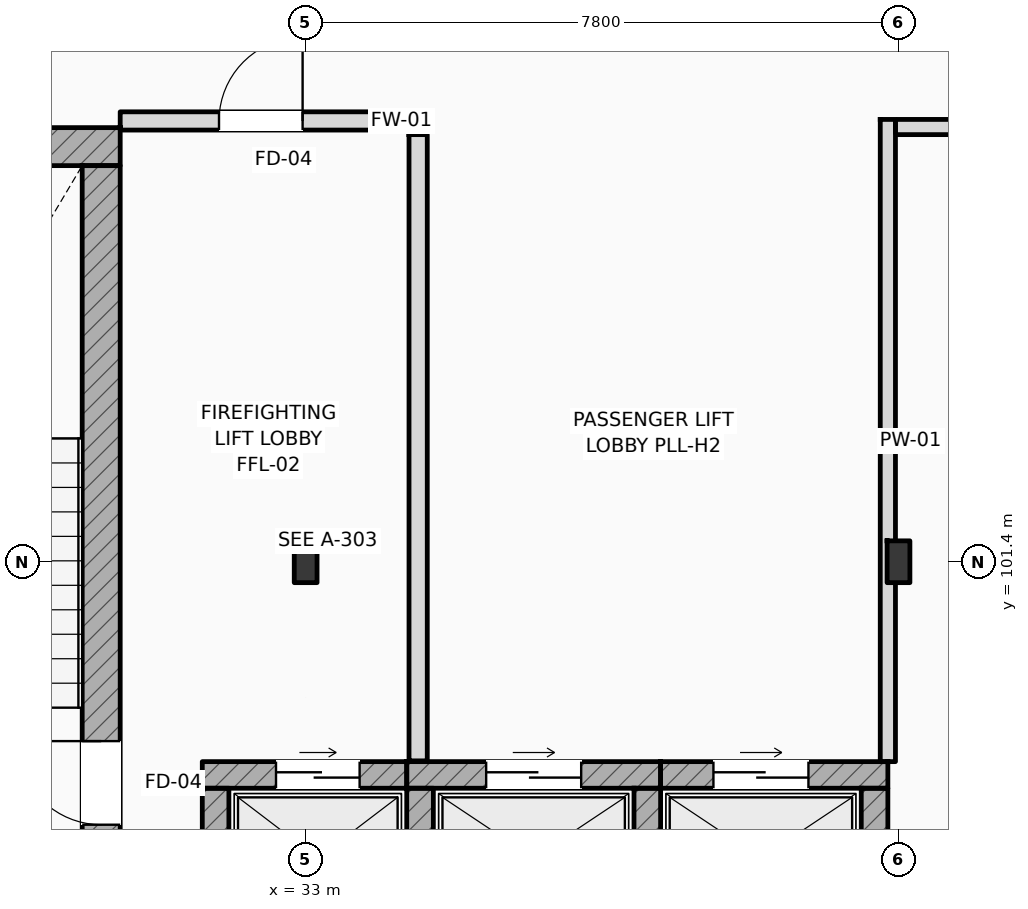
"""IFC4 building model, lengths in metres.
Left out: names, types, materials, properties, quantities, classifications, styles, units other than length and angle.
Written with IfcOpenShell. Run it as: python <this file> out.ifc"""

import sys

from ifc_helpers import new_model, si_unit, direction, frame, frame_2d, origin, origin_2d, place, context, subcontext, project, spatial, rectangle, i_section, extrude, element, fill, save


model = new_model("IFC4")
c1 = context("Model", 3, precision=1e-05, world=origin(), true_north=direction((0.0, 1.0)))
c2 = subcontext(c1, "Body", "Model", "MODEL_VIEW")
j1 = project(units=[si_unit("LENGTHUNIT", "METRE"), si_unit("PLANEANGLEUNIT", "RADIAN")], contexts=[c1])
p1 = place(None, origin())
s1 = spatial("IfcSite", under=j1, at=p1, CompositionType="ELEMENT")
p2 = place(p1, origin())
s2 = spatial("IfcBuilding", under=s1, at=p2, CompositionType="ELEMENT")
p3 = place(p2, frame((0.0, 0.0, 20.4)))
s3 = spatial("IfcBuildingStorey", under=s2, at=p3, CompositionType="ELEMENT", Elevation=20.4)
for number, where, z_axis, x_axis in (
    (1, (33.0, 101.4, 0.0), (0.0, 0.0, 1.0), (1.0, 0.0, 0.0)),
    (2, (40.8, 101.4, 0.0), (0.0, 0.0, 1.0), (1.0, 0.0, 0.0)),
):
    element("IfcColumn", number, at=place(p3, frame(where, z_axis=z_axis, x_axis=x_axis)), inside=s3, PredefinedType="COLUMN", context=c2, shape_type="SweptSolid", body=[
        extrude(i_section(OverallWidth=0.3, OverallDepth=0.55, WebThickness=0.015, FlangeThickness=0.029, FilletRadius=0.027, at=origin_2d()), origin(), (0.0, 0.0, 1.0), 4.2),
    ])
p4 = place(p3, frame((25.4, 106.862, 0.0), z_axis=(0.0, 0.0, 1.0), x_axis=(1.0, 0.0, 0.0)))
e3 = element("IfcWall", 3, at=p4, inside=s3, PredefinedType="SHEAR", context=c2, shape_type="SweptSolid", body=[
    extrude(rectangle(XDim=5.16, YDim=0.5, at=frame_2d((2.58, 0.0))), origin(), (0.0, 0.0, 1.0), 4.2),
])
p5 = place(p3, frame((30.31, 97.5, 0.0), z_axis=(0.0, 0.0, 1.0), x_axis=(0.0, 1.0, 0.0)))
e4 = element("IfcWall", 4, at=p5, inside=s3, PredefinedType="SHEAR", context=c2, shape_type="SweptSolid", body=[
    extrude(rectangle(XDim=9.112, YDim=0.5, at=frame_2d((4.556, 0.0))), origin(), (0.0, 0.0, 1.0), 4.2),
])
p6 = place(p5, frame((0.44, 0.0, 0.0)))
e5 = element("IfcOpeningElement", 5, at=p6, cuts=e4, PredefinedType="OPENING", context=c2, shape_type="SweptSolid", body=[
    extrude(rectangle(XDim=1.1, YDim=2.2, at=frame_2d((0.55, 1.1))), frame((0.0, 0.26, 0.0), z_axis=(0.0, -1.0, 0.0), x_axis=(1.0, 0.0, 0.0)), (0.0, 0.0, 1.0), 0.52),
])
p7 = place(p3, frame((31.64, 98.595, 0.0), z_axis=(0.0, 0.0, 1.0), x_axis=(1.0, 0.0, 0.0)))
e6 = element("IfcWall", 6, at=p7, inside=s3, PredefinedType="SHEAR", context=c2, shape_type="SweptSolid", body=[
    extrude(rectangle(XDim=2.69, YDim=0.35, at=frame_2d((1.345, 0.0))), origin(), (0.0, 0.0, 1.0), 3.94),
])
p8 = place(p7, frame((0.97, 0.0, 0.0)))
e7 = element("IfcOpeningElement", 7, at=p8, cuts=e6, PredefinedType="OPENING", context=c2, shape_type="SweptSolid", body=[
    extrude(rectangle(XDim=1.1, YDim=2.2, at=frame_2d((0.55, 1.1))), frame((0.0, 0.185, 0.0), z_axis=(0.0, -1.0, 0.0), x_axis=(1.0, 0.0, 0.0)), (0.0, 0.0, 1.0), 0.37),
])
p9 = place(p3, frame((31.815, 96.58, 0.0), z_axis=(0.0, 0.0, 1.0), x_axis=(0.0, 1.0, 0.0)))
e8 = element("IfcWall", 8, at=p9, inside=s3, PredefinedType="SHEAR", context=c2, shape_type="SweptSolid", body=[
    extrude(rectangle(XDim=1.84, YDim=0.35, at=frame_2d((0.92, 0.0))), origin(), (0.0, 0.0, 1.0), 3.94),
])
p10 = place(p3, frame((34.33, 98.595, 0.0), z_axis=(0.0, 0.0, 1.0), x_axis=(1.0, 0.0, 0.0)))
e9 = element("IfcWall", 9, at=p10, inside=s3, PredefinedType="SHEAR", context=c2, shape_type="SweptSolid", body=[
    extrude(rectangle(XDim=3.34, YDim=0.35, at=frame_2d((1.67, 0.0))), origin(), (0.0, 0.0, 1.0), 3.94),
])
p11 = place(p10, frame((1.045, 0.0, 0.0)))
e10 = element("IfcOpeningElement", 10, at=p11, cuts=e9, PredefinedType="OPENING", context=c2, shape_type="SweptSolid", body=[
    extrude(rectangle(XDim=1.25, YDim=2.25, at=frame_2d((0.625, 1.125))), frame((0.0, 0.185, 0.0), z_axis=(0.0, -1.0, 0.0), x_axis=(1.0, 0.0, 0.0)), (0.0, 0.0, 1.0), 0.37),
])
for number, where, z_axis, x_axis in (
    (11, (34.505, 96.58, 0.0), (0.0, 0.0, 1.0), (0.0, 1.0, 0.0)),
    (12, (37.495, 96.58, 0.0), (0.0, 0.0, 1.0), (0.0, 1.0, 0.0)),
):
    element("IfcWall", number, at=place(p3, frame(where, z_axis=z_axis, x_axis=x_axis)), inside=s3, PredefinedType="SHEAR", context=c2, shape_type="SweptSolid", body=[
        extrude(rectangle(XDim=1.84, YDim=0.35, at=frame_2d((0.92, 0.0))), origin(), (0.0, 0.0, 1.0), 3.94),
    ])
p12 = place(p3, frame((37.67, 98.595, 0.0), z_axis=(0.0, 0.0, 1.0), x_axis=(1.0, 0.0, 0.0)))
e13 = element("IfcWall", 13, at=p12, inside=s3, PredefinedType="SHEAR", context=c2, shape_type="SweptSolid", body=[
    extrude(rectangle(XDim=2.99, YDim=0.35, at=frame_2d((1.495, 0.0))), origin(), (0.0, 0.0, 1.0), 3.94),
])
p13 = place(p12, frame((0.695, 0.0, 0.0)))
e14 = element("IfcOpeningElement", 14, at=p13, cuts=e13, PredefinedType="OPENING", context=c2, shape_type="SweptSolid", body=[
    extrude(rectangle(XDim=1.25, YDim=2.25, at=frame_2d((0.625, 1.125))), frame((0.0, 0.185, 0.0), z_axis=(0.0, -1.0, 0.0), x_axis=(1.0, 0.0, 0.0)), (0.0, 0.0, 1.0), 0.37),
])
p14 = place(p3, frame((40.485, 96.58, 0.0), z_axis=(0.0, 0.0, 1.0), x_axis=(0.0, 1.0, 0.0)))
e15 = element("IfcWall", 15, at=p14, inside=s3, PredefinedType="SHEAR", context=c2, shape_type="SweptSolid", body=[
    extrude(rectangle(XDim=1.84, YDim=0.35, at=frame_2d((0.92, 0.0))), origin(), (0.0, 0.0, 1.0), 3.53),
])
p15 = place(p3, frame((34.48, 98.78, 0.0), z_axis=(0.0, 0.0, 1.0), x_axis=(0.0, 1.0, 0.0)))
e16 = element("IfcWall", 16, at=p15, inside=s3, PredefinedType="STANDARD", context=c2, shape_type="SweptSolid", body=[
    extrude(rectangle(XDim=8.24, YDim=0.24, at=frame_2d((4.12, 0.0))), origin(), (0.0, 0.0, 1.0), 3.94),
])
p16 = place(p3, frame((30.56, 107.2, 0.0), z_axis=(0.0, 0.0, 1.0), x_axis=(1.0, 0.0, 0.0)))
e17 = element("IfcWall", 17, at=p16, inside=s3, PredefinedType="STANDARD", context=c2, shape_type="SweptSolid", body=[
    extrude(rectangle(XDim=4.1, YDim=0.24, at=frame_2d((2.05, 0.0))), origin(), (0.0, 0.0, 1.0), 3.94),
])
p17 = place(p16, frame((1.3, 0.0, 0.0)))
e18 = element("IfcOpeningElement", 18, at=p17, cuts=e17, PredefinedType="OPENING", context=c2, shape_type="SweptSolid", body=[
    extrude(rectangle(XDim=1.1, YDim=2.2, at=frame_2d((0.55, 1.1))), frame((0.0, 0.13, 0.0), z_axis=(0.0, -1.0, 0.0), x_axis=(1.0, 0.0, 0.0)), (0.0, 0.0, 1.0), 0.26),
])
p18 = place(p3, frame((40.76, 107.12, 0.0), z_axis=(0.0, 0.0, 1.0), x_axis=(1.0, 0.0, 0.0)))
e19 = element("IfcWall", 19, at=p18, inside=s3, PredefinedType="PARTITIONING", context=c2, shape_type="SweptSolid", body=[
    extrude(rectangle(XDim=23.44, YDim=0.2, at=frame_2d((11.72, 0.0))), origin(), (0.0, 0.0, 1.0), 3.94),
])
p19 = place(p18, frame((11.0, 0.0, 0.0)))
e20 = element("IfcOpeningElement", 20, at=p19, cuts=e19, PredefinedType="OPENING", context=c2, shape_type="SweptSolid", body=[
    extrude(rectangle(XDim=1.3, YDim=2.2, at=frame_2d((0.65, 1.1))), frame((0.0, 0.11, 0.0), z_axis=(0.0, -1.0, 0.0), x_axis=(1.0, 0.0, 0.0)), (0.0, 0.0, 1.0), 0.22),
])
p20 = place(p3, frame((40.66, 98.77, 0.0), z_axis=(0.0, 0.0, 1.0), x_axis=(0.0, 1.0, 0.0)))
e21 = element("IfcWall", 21, at=p20, inside=s3, PredefinedType="PARTITIONING", context=c2, shape_type="SweptSolid", body=[
    extrude(rectangle(XDim=8.45, YDim=0.2, at=frame_2d((4.225, 0.0))), origin(), (0.0, 0.0, 1.0), 3.53),
])
p21 = place(p6, origin())
e22 = element("IfcDoor", 22, at=p21, inside=s3, OperationType="SINGLE_SWING_RIGHT", PredefinedType="DOOR", context=c2, shape_type="SweptSolid", body=[
    extrude(rectangle(XDim=1.1, YDim=2.2, at=frame_2d((0.55, 1.1))), frame((0.0, 0.025, 0.0), z_axis=(0.0, -1.0, 0.0), x_axis=(1.0, 0.0, 0.0)), (0.0, 0.0, 1.0), 0.05),
])
fill(e5, e22)
p22 = place(p8, origin())
e23 = element("IfcDoor", 23, at=p22, inside=s3, OperationType="SLIDING_TO_LEFT", PredefinedType="DOOR", context=c2, shape_type="SweptSolid", body=[
    extrude(rectangle(XDim=1.1, YDim=2.2, at=frame_2d((0.55, 1.1))), frame((0.0, 0.025, 0.0), z_axis=(0.0, -1.0, 0.0), x_axis=(1.0, 0.0, 0.0)), (0.0, 0.0, 1.0), 0.05),
])
fill(e7, e23)
p23 = place(p11, origin())
e24 = element("IfcDoor", 24, at=p23, inside=s3, OperationType="SLIDING_TO_LEFT", PredefinedType="DOOR", context=c2, shape_type="SweptSolid", body=[
    extrude(rectangle(XDim=1.25, YDim=2.25, at=frame_2d((0.625, 1.125))), frame((0.0, 0.025, 0.0), z_axis=(0.0, -1.0, 0.0), x_axis=(1.0, 0.0, 0.0)), (0.0, 0.0, 1.0), 0.05),
])
fill(e10, e24)
p24 = place(p13, origin())
e25 = element("IfcDoor", 25, at=p24, inside=s3, OperationType="SLIDING_TO_LEFT", PredefinedType="DOOR", context=c2, shape_type="SweptSolid", body=[
    extrude(rectangle(XDim=1.25, YDim=2.25, at=frame_2d((0.625, 1.125))), frame((0.0, 0.025, 0.0), z_axis=(0.0, -1.0, 0.0), x_axis=(1.0, 0.0, 0.0)), (0.0, 0.0, 1.0), 0.05),
])
fill(e14, e25)
p25 = place(p17, origin())
e26 = element("IfcDoor", 26, at=p25, inside=s3, OperationType="SINGLE_SWING_RIGHT", PredefinedType="DOOR", context=c2, shape_type="SweptSolid", body=[
    extrude(rectangle(XDim=1.1, YDim=2.2, at=frame_2d((0.55, 1.1))), frame((0.0, 0.025, 0.0), z_axis=(0.0, -1.0, 0.0), x_axis=(1.0, 0.0, 0.0)), (0.0, 0.0, 1.0), 0.05),
])
fill(e18, e26)
save(model, sys.argv[1])
